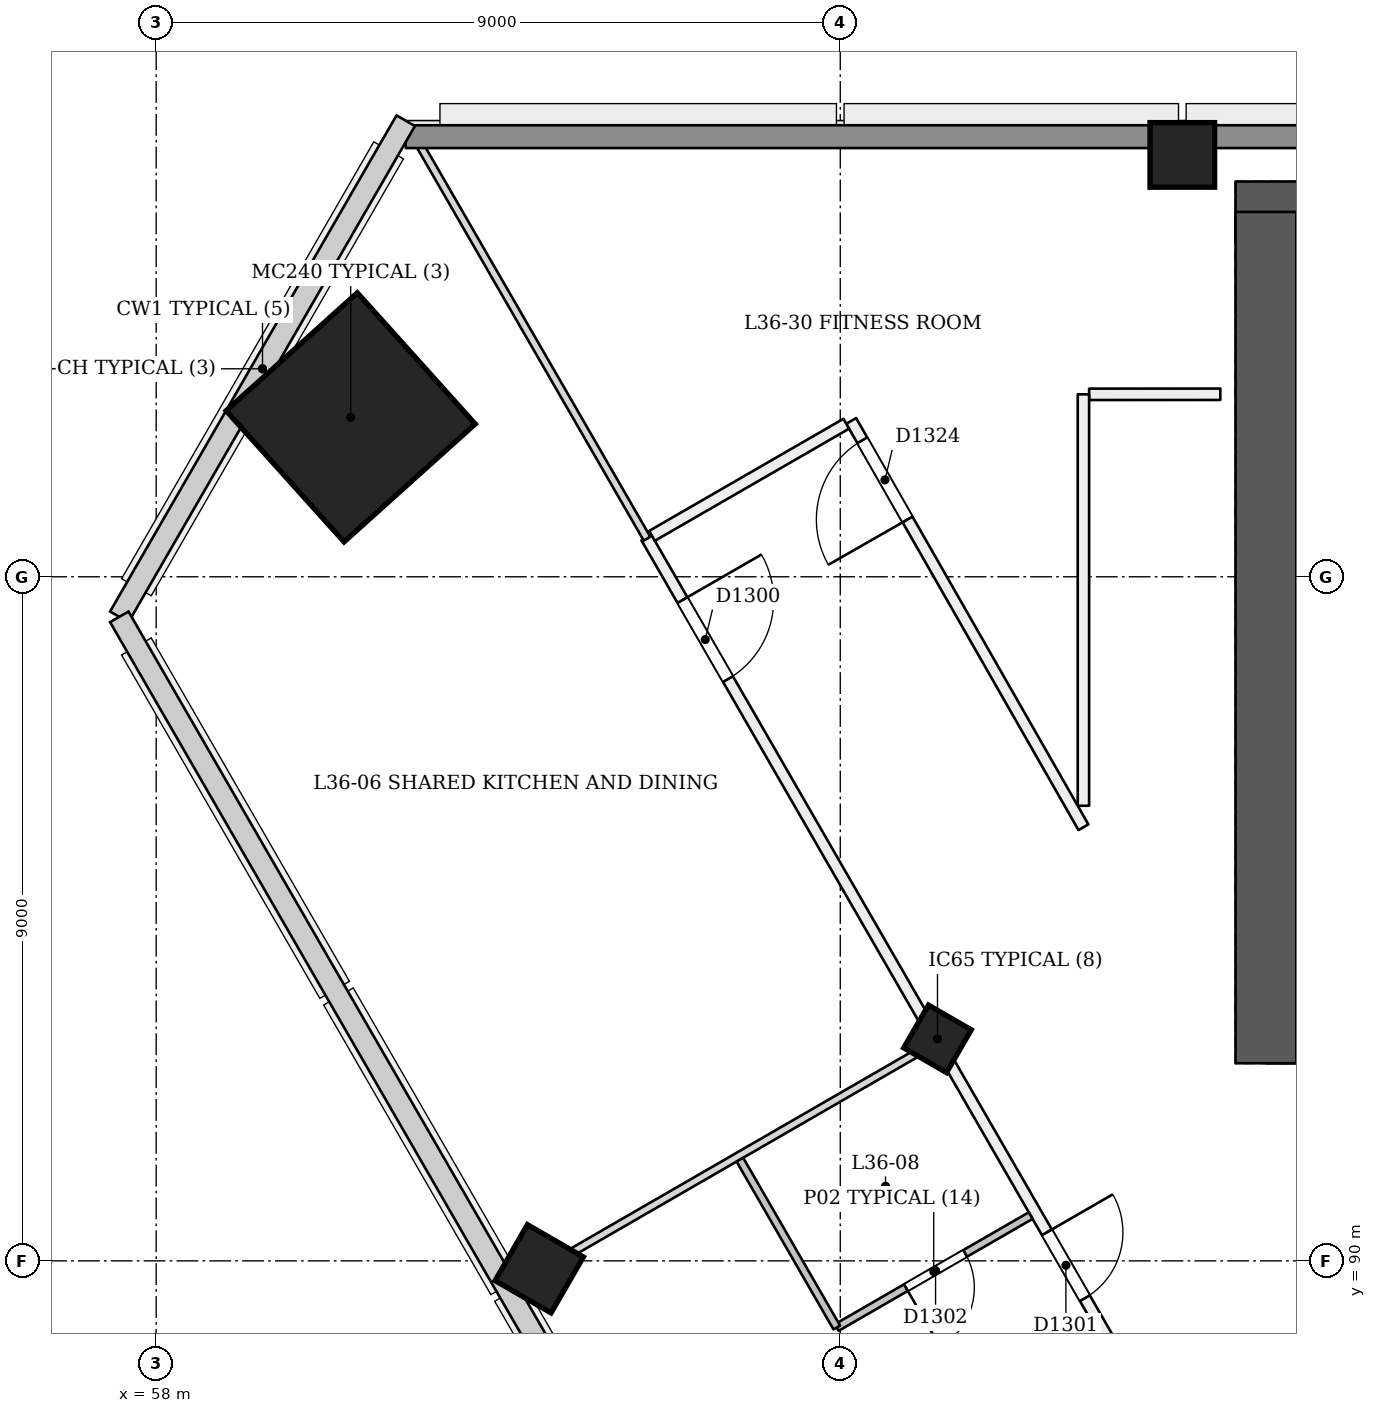
"""IFC4 building model, lengths in metres.
Left out: names, types, materials, properties, quantities, classifications, styles, units other than length and angle.
Written with IfcOpenShell. Run it as: python <this file> out.ifc"""

import sys

from ifc_helpers import new_model, si_unit, direction, frame, frame_2d, origin, origin_2d, place, context, subcontext, project, spatial, rectangle, extrude, element, fill, save


model = new_model("IFC4")
c1 = context("Model", 3, precision=1e-05, world=origin(), true_north=direction((0.0, 1.0)))
c2 = subcontext(c1, "Body", "Model", "MODEL_VIEW")
j1 = project(units=[si_unit("LENGTHUNIT", "METRE"), si_unit("PLANEANGLEUNIT", "RADIAN")], contexts=[c1])
p1 = place(None, origin())
s1 = spatial("IfcSite", under=j1, at=p1, CompositionType="ELEMENT")
p2 = place(p1, origin())
s2 = spatial("IfcBuilding", under=s1, at=p2, CompositionType="ELEMENT")
p3 = place(p2, frame((0.0, 0.0, 142.2)))
s3 = spatial("IfcBuildingStorey", under=s2, at=p3, CompositionType="ELEMENT", Elevation=142.2)
p4 = place(p3, frame((72.6, 93.0, 0.0), z_axis=(0.0, 0.0, 1.0), x_axis=(1.0, 0.0, 0.0)))
e1 = element("IfcWall", 1, at=p4, inside=s3, PredefinedType="SHEAR", context=c2, shape_type="SweptSolid", body=[
    extrude(rectangle(XDim=25.2, YDim=0.8, at=frame_2d((12.6, 0.0))), origin(), (0.0, 0.0, 1.0), 3.6),
])
p5 = place(p4, frame((1.2, 0.0, 0.0)))
e2 = element("IfcOpeningElement", 2, at=p5, cuts=e1, PredefinedType="OPENING", context=c2, shape_type="SweptSolid", body=[
    extrude(rectangle(XDim=1.2, YDim=2.1, at=frame_2d((0.6, 1.05))), frame((0.0, 0.411, 0.0), z_axis=(0.0, -1.0, 0.0), x_axis=(1.0, 0.0, 0.0)), (0.0, 0.0, 1.0), 0.821),
])
p6 = place(p4, frame((3.4, 0.0, 0.0)))
e3 = element("IfcOpeningElement", 3, at=p6, cuts=e1, PredefinedType="OPENING", context=c2, shape_type="SweptSolid", body=[
    extrude(rectangle(XDim=1.2, YDim=2.1, at=frame_2d((0.6, 1.05))), frame((0.0, 0.411, 0.0), z_axis=(0.0, -1.0, 0.0), x_axis=(1.0, 0.0, 0.0)), (0.0, 0.0, 1.0), 0.821),
])
p7 = place(p4, frame((13.4, 0.0, 0.0)))
e4 = element("IfcOpeningElement", 4, at=p7, cuts=e1, PredefinedType="OPENING", context=c2, shape_type="SweptSolid", body=[
    extrude(rectangle(XDim=1.2, YDim=2.1, at=frame_2d((0.6, 1.05))), frame((0.0, 0.411, 0.0), z_axis=(0.0, -1.0, 0.0), x_axis=(1.0, 0.0, 0.0)), (0.0, 0.0, 1.0), 0.821),
])
p8 = place(p4, frame((15.462, 0.0, 0.0)))
e5 = element("IfcOpeningElement", 5, at=p8, cuts=e1, PredefinedType="OPENING", context=c2, shape_type="SweptSolid", body=[
    extrude(rectangle(XDim=1.0, YDim=2.1, at=frame_2d((0.5, 1.05))), frame((0.0, 0.411, 0.0), z_axis=(0.0, -1.0, 0.0), x_axis=(1.0, 0.0, 0.0)), (0.0, 0.0, 1.0), 0.821),
])
p9 = place(p4, frame((17.7, 0.0, 0.0)))
e6 = element("IfcOpeningElement", 6, at=p9, cuts=e1, PredefinedType="OPENING", context=c2, shape_type="SweptSolid", body=[
    extrude(rectangle(XDim=1.0, YDim=2.1, at=frame_2d((0.5, 1.05))), frame((0.0, 0.411, 0.0), z_axis=(0.0, -1.0, 0.0), x_axis=(1.0, 0.0, 0.0)), (0.0, 0.0, 1.0), 0.821),
])
p10 = place(p4, frame((20.25, 0.0, 0.0)))
e7 = element("IfcOpeningElement", 7, at=p10, cuts=e1, PredefinedType="OPENING", context=c2, shape_type="SweptSolid", body=[
    extrude(rectangle(XDim=1.0, YDim=2.1, at=frame_2d((0.5, 1.05))), frame((0.0, 0.411, 0.0), z_axis=(0.0, -1.0, 0.0), x_axis=(1.0, 0.0, 0.0)), (0.0, 0.0, 1.0), 0.821),
])
p11 = place(p4, frame((22.738, 0.0, 0.0)))
e8 = element("IfcOpeningElement", 8, at=p11, cuts=e1, PredefinedType="OPENING", context=c2, shape_type="SweptSolid", body=[
    extrude(rectangle(XDim=1.0, YDim=2.1, at=frame_2d((0.5, 1.05))), frame((0.0, 0.411, 0.0), z_axis=(0.0, -1.0, 0.0), x_axis=(1.0, 0.0, 0.0)), (0.0, 0.0, 1.0), 0.821),
])
p12 = place(p3, frame((97.4, 103.8, 0.0), z_axis=(0.0, 0.0, 1.0), x_axis=(-1.0, 0.0, 0.0)))
e9 = element("IfcWall", 9, at=p12, inside=s3, PredefinedType="SHEAR", context=c2, shape_type="SweptSolid", body=[
    extrude(rectangle(XDim=25.2, YDim=0.8, at=frame_2d((12.6, 0.0))), origin(), (0.0, 0.0, 1.0), 3.6),
])
p13 = place(p3, frame((72.6, 103.8, 0.0), z_axis=(0.0, 0.0, 1.0), x_axis=(0.0, -1.0, 0.0)))
e10 = element("IfcWall", 10, at=p13, inside=s3, PredefinedType="SHEAR", context=c2, shape_type="SweptSolid", body=[
    extrude(rectangle(XDim=11.2, YDim=0.8, at=frame_2d((5.6, 0.0))), origin(), (0.0, 0.0, 1.0), 3.6),
])
p14 = place(p3, frame((68.252, 92.874, -0.02), z_axis=(0.022153634206, 0.038480930364, 0.999013730882), x_axis=(-0.864977033913, -0.50033593071, 0.038453702613)))
e11 = element("IfcColumn", 11, at=p14, inside=s3, PredefinedType="COLUMN", context=c2, shape_type="SweptSolid", body=[
    extrude(rectangle(XDim=0.65, YDim=0.65, at=origin_2d()), origin(), (0.0, 0.0, 1.0), 3.604),
])
p15 = place(p3, frame((60.525, 101.086, 0.0), z_axis=(0.028334084323, 0.009218745139, 0.999555998633), x_axis=(-0.865470136815, 0.500564453885, 0.019916570694)))
e12 = element("IfcColumn", 12, at=p15, inside=s3, PredefinedType="COLUMN", context=c2, shape_type="SweptSolid", body=[
    extrude(rectangle(XDim=2.32, YDim=2.32, at=origin_2d()), origin(), (0.0, 0.0, 1.0), 3.602),
])
p16 = place(p3, frame((71.5, 104.55, 0.0), z_axis=(0.0, 0.0, 1.0), x_axis=(1.0, 0.0, 0.0)))
e13 = element("IfcColumn", 13, at=p16, inside=s3, PredefinedType="COLUMN", context=c2, shape_type="SweptSolid", body=[
    extrude(rectangle(XDim=0.85, YDim=0.85, at=origin_2d()), origin(), (0.0, 0.0, 1.0), 3.6),
])
p17 = place(p3, frame((63.012, 89.849, -0.026), z_axis=(0.022222910879, 0.038415824599, 0.999014697916), x_axis=(-0.866021331072, -0.498527657424, 0.038434735731)))
e14 = element("IfcColumn", 14, at=p17, inside=s3, PredefinedType="COLUMN", context=c2, shape_type="SweptSolid", body=[
    extrude(rectangle(XDim=0.85, YDim=0.85, at=origin_2d()), origin(), (0.0, 0.0, 1.0), 3.604),
])
p18 = place(p3, frame((64.449, 99.517, 0.0), z_axis=(0.0, 0.0, 1.0), x_axis=(0.499425839766, -0.866356641675, 0.0)))
e15 = element("IfcWall", 15, at=p18, inside=s3, PredefinedType="PARTITIONING", context=c2, shape_type="SweptSolid", body=[
    extrude(rectangle(XDim=41.118, YDim=0.15, at=frame_2d((20.559, 0.0))), origin(), (0.0, 0.0, 1.0), 2.75),
])
p19 = place(p18, frame((0.951, 0.0, 0.0)))
e16 = element("IfcOpeningElement", 16, at=p19, cuts=e15, PredefinedType="OPENING", context=c2, shape_type="SweptSolid", body=[
    extrude(rectangle(XDim=1.2, YDim=2.1, at=frame_2d((0.6, 1.05))), frame((0.0, 0.085, 0.0), z_axis=(0.0, -1.0, 0.0), x_axis=(1.0, 0.0, 0.0)), (0.0, 0.0, 1.0), 0.171),
])
p20 = place(p18, frame((10.552, 0.0, 0.0)))
e17 = element("IfcOpeningElement", 17, at=p20, cuts=e15, PredefinedType="OPENING", context=c2, shape_type="SweptSolid", body=[
    extrude(rectangle(XDim=1.0, YDim=2.1, at=frame_2d((0.5, 1.05))), frame((0.0, 0.085, 0.0), z_axis=(0.0, -1.0, 0.0), x_axis=(1.0, 0.0, 0.0)), (0.0, 0.0, 1.0), 0.171),
])
p21 = place(p18, frame((12.762, 0.0, 0.0)))
e18 = element("IfcOpeningElement", 18, at=p21, cuts=e15, PredefinedType="OPENING", context=c2, shape_type="SweptSolid", body=[
    extrude(rectangle(XDim=1.0, YDim=2.1, at=frame_2d((0.5, 1.05))), frame((0.0, 0.085, 0.0), z_axis=(0.0, -1.0, 0.0), x_axis=(1.0, 0.0, 0.0)), (0.0, 0.0, 1.0), 0.171),
])
p22 = place(p18, frame((20.557, 0.0, 0.0)))
e19 = element("IfcOpeningElement", 19, at=p22, cuts=e15, PredefinedType="OPENING", context=c2, shape_type="SweptSolid", body=[
    extrude(rectangle(XDim=1.2, YDim=2.1, at=frame_2d((0.6, 1.05))), frame((0.0, 0.085, 0.0), z_axis=(0.0, -1.0, 0.0), x_axis=(1.0, 0.0, 0.0)), (0.0, 0.0, 1.0), 0.171),
])
p23 = place(p18, frame((28.436, 0.0, 0.0)))
e20 = element("IfcOpeningElement", 20, at=p23, cuts=e15, PredefinedType="OPENING", context=c2, shape_type="SweptSolid", body=[
    extrude(rectangle(XDim=1.0, YDim=2.1, at=frame_2d((0.5, 1.05))), frame((0.0, 0.085, 0.0), z_axis=(0.0, -1.0, 0.0), x_axis=(1.0, 0.0, 0.0)), (0.0, 0.0, 1.0), 0.171),
])
p24 = place(p18, frame((32.957, 0.0, 0.0)))
e21 = element("IfcOpeningElement", 21, at=p24, cuts=e15, PredefinedType="OPENING", context=c2, shape_type="SweptSolid", body=[
    extrude(rectangle(XDim=1.2, YDim=2.1, at=frame_2d((0.6, 1.05))), frame((0.0, 0.085, 0.0), z_axis=(0.0, -1.0, 0.0), x_axis=(1.0, 0.0, 0.0)), (0.0, 0.0, 1.0), 0.171),
])
p25 = place(p18, frame((39.53, 0.0, 0.0)))
e22 = element("IfcOpeningElement", 22, at=p25, cuts=e15, PredefinedType="OPENING", context=c2, shape_type="SweptSolid", body=[
    extrude(rectangle(XDim=1.0, YDim=2.1, at=frame_2d((0.5, 1.05))), frame((0.0, 0.085, 0.0), z_axis=(0.0, -1.0, 0.0), x_axis=(1.0, 0.0, 0.0)), (0.0, 0.0, 1.0), 0.171),
])
p26 = place(p3, frame((72.0, 101.401, 0.0), z_axis=(0.0, 0.0, 1.0), x_axis=(-0.999999959988, -0.00028288542, 0.0)))
e23 = element("IfcWall", 23, at=p26, inside=s3, PredefinedType="PARTITIONING", context=c2, shape_type="SweptSolid", body=[
    extrude(rectangle(XDim=1.726, YDim=0.15, at=frame_2d((0.863, 0.0))), origin(), (0.0, 0.0, 1.0), 3.15),
])
p27 = place(p3, frame((70.199, 101.4, 0.0), z_axis=(0.0, 0.0, 1.0), x_axis=(0.0, -1.0, 0.0)))
e24 = element("IfcWall", 24, at=p27, inside=s3, PredefinedType="PARTITIONING", context=c2, shape_type="SweptSolid", body=[
    extrude(rectangle(XDim=5.413, YDim=0.15, at=frame_2d((2.707, 0.0))), origin(), (0.0, 0.0, 1.0), 3.15),
])
p28 = place(p3, frame((70.199, 95.705, 0.0), z_axis=(0.0, 0.0, 1.0), x_axis=(-0.496198719424, 0.868208978784, 0.0)))
e25 = element("IfcWall", 25, at=p28, inside=s3, PredefinedType="PARTITIONING", context=c2, shape_type="SweptSolid", body=[
    extrude(rectangle(XDim=6.157, YDim=0.15, at=frame_2d((3.079, 0.0))), origin(), (0.0, 0.0, 1.0), 3.15),
])
p29 = place(p28, frame((4.663, 0.0, 0.0)))
e26 = element("IfcOpeningElement", 26, at=p29, cuts=e25, PredefinedType="OPENING", context=c2, shape_type="SweptSolid", body=[
    extrude(rectangle(XDim=1.2, YDim=2.1, at=frame_2d((0.6, 1.05))), frame((0.0, 0.085, 0.0), z_axis=(0.0, -1.0, 0.0), x_axis=(1.0, 0.0, 0.0)), (0.0, 0.0, 1.0), 0.171),
])
p30 = place(p3, frame((67.079, 101.013, 0.0), z_axis=(0.0, 0.0, 1.0), x_axis=(-0.866101542152, -0.499868101284, 0.0)))
e27 = element("IfcWall", 27, at=p30, inside=s3, PredefinedType="PARTITIONING", context=c2, shape_type="SweptSolid", body=[
    extrude(rectangle(XDim=2.95, YDim=0.15, at=frame_2d((1.475, 0.0))), origin(), (0.0, 0.0, 1.0), 3.15),
])
p31 = place(p3, frame((62.71, 89.675, 0.0), z_axis=(0.0, 0.0, 1.0), x_axis=(0.866026091839, 0.499998808253, 0.0)))
e28 = element("IfcWall", 28, at=p31, inside=s3, PredefinedType="PARTITIONING", context=c2, shape_type="SweptSolid", body=[
    extrude(rectangle(XDim=6.347, YDim=0.1, at=frame_2d((3.174, 0.0))), origin(), (0.0, 0.0, 1.0), 2.65),
])
p32 = place(p3, frame((64.458, 99.501, 0.0), z_axis=(0.0, 0.0, 1.0), x_axis=(-0.500013984911, 0.866017329442, 0.0)))
e29 = element("IfcWall", 29, at=p32, inside=s3, PredefinedType="PARTITIONING", context=c2, shape_type="SweptSolid", body=[
    extrude(rectangle(XDim=6.234, YDim=0.1, at=frame_2d((3.117, 0.0))), origin(), (0.0, 0.0, 1.0), 2.65),
])
p33 = place(p3, frame((69.505, 90.596, 0.0), z_axis=(0.0, 0.0, 1.0), x_axis=(-0.865995096467, -0.50005249014, 0.0)))
e30 = element("IfcWall", 30, at=p33, inside=s3, PredefinedType="PARTITIONING", context=c2, shape_type="SweptSolid", body=[
    extrude(rectangle(XDim=2.946, YDim=0.1, at=frame_2d((1.473, 0.0))), origin(), (0.0, 0.0, 1.0), 3.15),
])
p34 = place(p33, frame((0.995, 0.0, 0.0)))
e31 = element("IfcOpeningElement", 31, at=p34, cuts=e30, PredefinedType="OPENING", context=c2, shape_type="SweptSolid", body=[
    extrude(rectangle(XDim=0.9, YDim=2.1, at=frame_2d((0.45, 1.05))), frame((0.0, 0.061, 0.0), z_axis=(0.0, -1.0, 0.0), x_axis=(1.0, 0.0, 0.0)), (0.0, 0.0, 1.0), 0.121),
])
p35 = place(p3, frame((66.954, 89.123, 0.0), z_axis=(0.0, 0.0, 1.0), x_axis=(-0.499948979701, 0.866054858364, 0.0)))
e32 = element("IfcWall", 32, at=p35, inside=s3, PredefinedType="PARTITIONING", context=c2, shape_type="SweptSolid", body=[
    extrude(rectangle(XDim=2.55, YDim=0.1, at=frame_2d((1.275, 0.0))), origin(), (0.0, 0.0, 1.0), 2.75),
])
p36 = place(p3, frame((61.283, 104.79, 0.0), z_axis=(0.0, 0.0, 1.0), x_axis=(1.0, 0.0, 0.0)))
e33 = element("IfcWall", 33, at=p36, inside=s3, PredefinedType="SOLIDWALL", context=c2, shape_type="SweptSolid", body=[
    extrude(rectangle(XDim=47.434, YDim=0.3, at=frame_2d((23.717, 0.0))), origin(), (0.0, 0.0, 1.0), 2.65),
])
p37 = place(p19, origin())
e34 = element("IfcDoor", 34, at=p37, inside=s3, OperationType="SINGLE_SWING_LEFT", PredefinedType="NOTDEFINED", context=c2, shape_type="SweptSolid", body=[
    extrude(rectangle(XDim=1.2, YDim=2.1, at=frame_2d((0.6, 1.05))), frame((0.0, 0.025, 0.0), z_axis=(0.0, -1.0, 0.0), x_axis=(1.0, 0.0, 0.0)), (0.0, 0.0, 1.0), 0.05),
])
fill(e16, e34)
p38 = place(p20, origin())
e35 = element("IfcDoor", 35, at=p38, inside=s3, OperationType="SINGLE_SWING_LEFT", PredefinedType="NOTDEFINED", context=c2, shape_type="SweptSolid", body=[
    extrude(rectangle(XDim=1.0, YDim=2.1, at=frame_2d((0.5, 1.05))), frame((0.0, 0.025, 0.0), z_axis=(0.0, -1.0, 0.0), x_axis=(1.0, 0.0, 0.0)), (0.0, 0.0, 1.0), 0.05),
])
fill(e17, e35)
p39 = place(p34, origin())
e36 = element("IfcDoor", 36, at=p39, inside=s3, OperationType="SINGLE_SWING_RIGHT", PredefinedType="NOTDEFINED", context=c2, shape_type="SweptSolid", body=[
    extrude(rectangle(XDim=0.9, YDim=2.1, at=frame_2d((0.45, 1.05))), frame((0.0, 0.025, 0.0), z_axis=(0.0, -1.0, 0.0), x_axis=(1.0, 0.0, 0.0)), (0.0, 0.0, 1.0), 0.05),
])
fill(e31, e36)
p40 = place(p29, origin())
e37 = element("IfcDoor", 37, at=p40, inside=s3, OperationType="SINGLE_SWING_LEFT", PredefinedType="NOTDEFINED", context=c2, shape_type="SweptSolid", body=[
    extrude(rectangle(XDim=1.2, YDim=2.1, at=frame_2d((0.6, 1.05))), frame((0.0, 0.025, 0.0), z_axis=(0.0, -1.0, 0.0), x_axis=(1.0, 0.0, 0.0)), (0.0, 0.0, 1.0), 0.05),
])
fill(e26, e37)
save(model, sys.argv[1])
